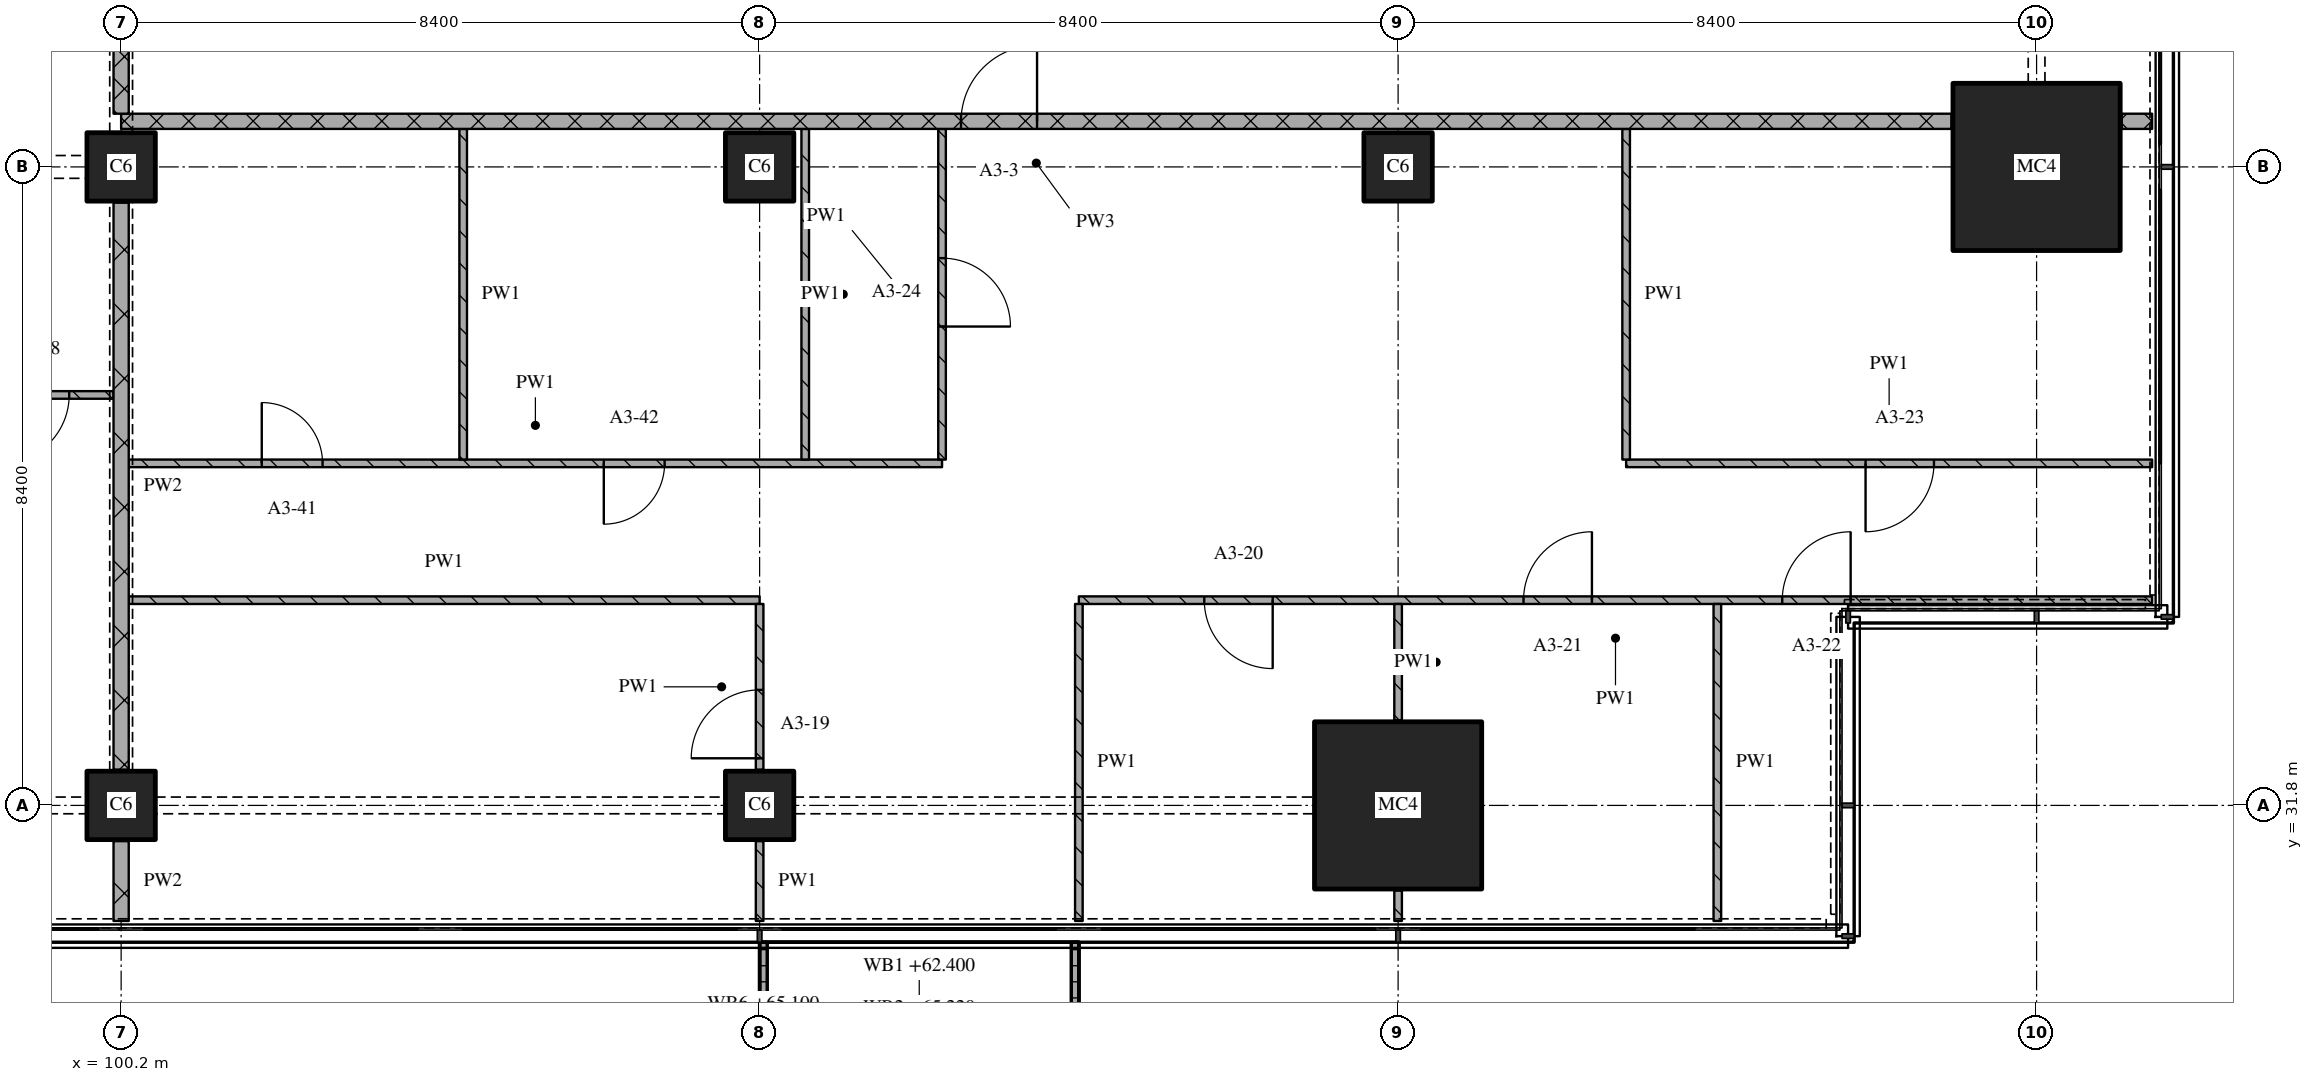
"""IFC4 building model, lengths in metres.
Left out: names, types, materials, properties, quantities, classifications, styles, units other than length and angle.
Written with IfcOpenShell. Run it as: python <this file> out.ifc"""

import sys

from ifc_helpers import new_model, si_unit, direction, frame, frame_2d, origin, origin_2d, place, context, subcontext, project, spatial, polyline, rectangle, outline, extrude, element, fill, save


model = new_model("IFC4")
c1 = context("Model", 3, precision=1e-05, world=origin(), true_north=direction((0.0, 1.0)))
c2 = subcontext(c1, "Body", "Model", "MODEL_VIEW")
j1 = project(units=[si_unit("LENGTHUNIT", "METRE"), si_unit("PLANEANGLEUNIT", "RADIAN")], contexts=[c1])
p1 = place(None, origin())
s1 = spatial("IfcSite", under=j1, at=p1, CompositionType="ELEMENT")
p2 = place(p1, origin())
s2 = spatial("IfcBuilding", under=s1, at=p2, CompositionType="ELEMENT")
p3 = place(p2, frame((0.0, 0.0, 62.4)))
s3 = spatial("IfcBuildingStorey", under=s2, at=p3, CompositionType="ELEMENT", Elevation=62.4)
for number, where, z_axis, x_axis in (
    (1, (100.2, 31.8, 0.0), (0.0, 0.0, 1.0), (1.0, 0.0, 0.0)),
    (2, (100.2, 40.2, 0.0), (0.0, 0.0, 1.0), (1.0, 0.0, 0.0)),
    (3, (108.6, 31.8, 0.0), (0.0, 0.0, 1.0), (1.0, 0.0, 0.0)),
    (4, (108.6, 40.2, 0.0), (0.0, 0.0, 1.0), (1.0, 0.0, 0.0)),
):
    element("IfcColumn", number, at=place(p3, frame(where, z_axis=z_axis, x_axis=x_axis)), inside=s3, PredefinedType="COLUMN", context=c2, shape_type="SweptSolid", body=[
        extrude(rectangle(XDim=0.9, YDim=0.9, at=origin_2d()), origin(), (0.0, 0.0, 1.0), 3.6),
    ])
p4 = place(p3, frame((117.0, 31.8, 0.0), z_axis=(0.0, 0.0, 1.0), x_axis=(1.0, 0.0, 0.0)))
e5 = element("IfcColumn", 5, at=p4, inside=s3, PredefinedType="COLUMN", context=c2, shape_type="SweptSolid", body=[
    extrude(rectangle(XDim=2.2, YDim=2.2, at=origin_2d()), origin(), (0.0, 0.0, 1.0), 3.6),
])
p5 = place(p3, frame((117.0, 40.2, 0.0), z_axis=(0.0, 0.0, 1.0), x_axis=(1.0, 0.0, 0.0)))
e6 = element("IfcColumn", 6, at=p5, inside=s3, PredefinedType="COLUMN", context=c2, shape_type="SweptSolid", body=[
    extrude(rectangle(XDim=0.9, YDim=0.9, at=origin_2d()), origin(), (0.0, 0.0, 1.0), 3.6),
])
p6 = place(p3, frame((125.4, 40.2, 0.0), z_axis=(0.0, 0.0, 1.0), x_axis=(1.0, 0.0, 0.0)))
e7 = element("IfcColumn", 7, at=p6, inside=s3, PredefinedType="COLUMN", context=c2, shape_type="SweptSolid", body=[
    extrude(rectangle(XDim=2.2, YDim=2.2, at=origin_2d()), origin(), (0.0, 0.0, 1.0), 3.6),
])
p7 = place(p3, origin())
e8 = element("IfcWall", 8, at=p7, inside=s3, PredefinedType="SOLIDWALL", context=c2, shape_type="SweptSolid", body=[
    extrude(outline(polyline([(108.6, 30.0), (108.7, 30.0), (108.7, 28.367), (112.7, 28.367), (112.7, 30.0), (112.8, 30.0), (112.8, 28.267), (108.6, 28.267), (108.6, 30.0)])), origin(), (0.0, 0.0, 1.0), 1.0),
])
p8 = place(p3, frame((100.3, 34.5, 0.0), z_axis=(0.0, 0.0, 1.0), x_axis=(1.0, 0.0, 0.0)))
e9 = element("IfcWall", 9, at=p8, inside=s3, PredefinedType="PARTITIONING", context=c2, shape_type="SweptSolid", body=[
    extrude(rectangle(XDim=8.3, YDim=0.1, at=frame_2d((4.15, 0.0))), origin(), (0.0, 0.0, 1.0), 3.32),
])
p9 = place(p3, frame((126.92, 34.5, 0.0), z_axis=(0.0, 0.0, 1.0), x_axis=(-1.0, 0.0, 0.0)))
e10 = element("IfcWall", 10, at=p9, inside=s3, PredefinedType="PARTITIONING", context=c2, shape_type="SweptSolid", body=[
    extrude(rectangle(XDim=14.12, YDim=0.1, at=frame_2d((7.06, 0.0))), origin(), (0.0, 0.0, 1.0), 3.32),
])
p10 = place(p9, frame((3.966, 0.0, 0.0)))
e11 = element("IfcOpeningElement", 11, at=p10, cuts=e10, PredefinedType="OPENING", context=c2, shape_type="SweptSolid", body=[
    extrude(rectangle(XDim=0.9, YDim=2.1, at=frame_2d((0.45, 1.05))), frame((0.0, 0.06, 0.0), z_axis=(0.0, -1.0, 0.0), x_axis=(1.0, 0.0, 0.0)), (0.0, 0.0, 1.0), 0.12),
])
p11 = place(p9, frame((7.37, 0.0, 0.0)))
e12 = element("IfcOpeningElement", 12, at=p11, cuts=e10, PredefinedType="OPENING", context=c2, shape_type="SweptSolid", body=[
    extrude(rectangle(XDim=0.9, YDim=2.1, at=frame_2d((0.45, 1.05))), frame((0.0, 0.06, 0.0), z_axis=(0.0, -1.0, 0.0), x_axis=(1.0, 0.0, 0.0)), (0.0, 0.0, 1.0), 0.12),
])
p12 = place(p9, frame((11.57, 0.0, 0.0)))
e13 = element("IfcOpeningElement", 13, at=p12, cuts=e10, PredefinedType="OPENING", context=c2, shape_type="SweptSolid", body=[
    extrude(rectangle(XDim=0.9, YDim=2.1, at=frame_2d((0.45, 1.05))), frame((0.0, 0.06, 0.0), z_axis=(0.0, -1.0, 0.0), x_axis=(1.0, 0.0, 0.0)), (0.0, 0.0, 1.0), 0.12),
])
p13 = place(p3, frame((100.3, 36.3, 0.0), z_axis=(0.0, 0.0, 1.0), x_axis=(1.0, 0.0, 0.0)))
e14 = element("IfcWall", 14, at=p13, inside=s3, PredefinedType="PARTITIONING", context=c2, shape_type="SweptSolid", body=[
    extrude(rectangle(XDim=10.7, YDim=0.1, at=frame_2d((5.35, 0.0))), origin(), (0.0, 0.0, 1.0), 3.32),
])
p14 = place(p13, frame((1.75, 0.0, 0.0)))
e15 = element("IfcOpeningElement", 15, at=p14, cuts=e14, PredefinedType="OPENING", context=c2, shape_type="SweptSolid", body=[
    extrude(rectangle(XDim=0.8, YDim=2.1, at=frame_2d((0.4, 1.05))), frame((0.0, 0.06, 0.0), z_axis=(0.0, -1.0, 0.0), x_axis=(1.0, 0.0, 0.0)), (0.0, 0.0, 1.0), 0.12),
])
p15 = place(p13, frame((6.25, 0.0, 0.0)))
e16 = element("IfcOpeningElement", 16, at=p15, cuts=e14, PredefinedType="OPENING", context=c2, shape_type="SweptSolid", body=[
    extrude(rectangle(XDim=0.8, YDim=2.1, at=frame_2d((0.4, 1.05))), frame((0.0, 0.06, 0.0), z_axis=(0.0, -1.0, 0.0), x_axis=(1.0, 0.0, 0.0)), (0.0, 0.0, 1.0), 0.12),
])
p16 = place(p3, frame((120.0, 36.3, 0.0), z_axis=(0.0, 0.0, 1.0), x_axis=(1.0, 0.0, 0.0)))
e17 = element("IfcWall", 17, at=p16, inside=s3, PredefinedType="PARTITIONING", context=c2, shape_type="SweptSolid", body=[
    extrude(rectangle(XDim=6.92, YDim=0.1, at=frame_2d((3.46, 0.0))), origin(), (0.0, 0.0, 1.0), 3.32),
])
p17 = place(p16, frame((3.15, 0.0, 0.0)))
e18 = element("IfcOpeningElement", 18, at=p17, cuts=e17, PredefinedType="OPENING", context=c2, shape_type="SweptSolid", body=[
    extrude(rectangle(XDim=0.9, YDim=2.1, at=frame_2d((0.45, 1.05))), frame((0.0, 0.06, 0.0), z_axis=(0.0, -1.0, 0.0), x_axis=(1.0, 0.0, 0.0)), (0.0, 0.0, 1.0), 0.12),
])
p18 = place(p3, frame((89.1, 37.2, 0.0), z_axis=(0.0, 0.0, 1.0), x_axis=(1.0, 0.0, 0.0)))
e19 = element("IfcWall", 19, at=p18, inside=s3, PredefinedType="PARTITIONING", context=c2, shape_type="SweptSolid", body=[
    extrude(rectangle(XDim=11.0, YDim=0.1, at=frame_2d((5.5, 0.0))), origin(), (0.0, 0.0, 1.0), 3.32),
])
p19 = place(p18, frame((6.225, 0.0, 0.0)))
e20 = element("IfcOpeningElement", 20, at=p19, cuts=e19, PredefinedType="OPENING", context=c2, shape_type="SweptSolid", body=[
    extrude(rectangle(XDim=0.8, YDim=2.1, at=frame_2d((0.4, 1.05))), frame((0.0, 0.06, 0.0), z_axis=(0.0, -1.0, 0.0), x_axis=(1.0, 0.0, 0.0)), (0.0, 0.0, 1.0), 0.12),
])
p20 = place(p18, frame((9.517, 0.0, 0.0)))
e21 = element("IfcOpeningElement", 21, at=p20, cuts=e19, PredefinedType="OPENING", context=c2, shape_type="SweptSolid", body=[
    extrude(rectangle(XDim=0.9, YDim=2.1, at=frame_2d((0.45, 1.05))), frame((0.0, 0.06, 0.0), z_axis=(0.0, -1.0, 0.0), x_axis=(1.0, 0.0, 0.0)), (0.0, 0.0, 1.0), 0.12),
])
p21 = place(p3, frame((124.28, 40.8, 0.0), z_axis=(0.0, 0.0, 1.0), x_axis=(-1.0, 0.0, 0.0)))
e22 = element("IfcWall", 22, at=p21, inside=s3, PredefinedType="PARTITIONING", context=c2, shape_type="SweptSolid", body=[
    extrude(rectangle(XDim=24.08, YDim=0.2, at=frame_2d((12.04, 0.0))), origin(), (0.0, 0.0, 1.0), 3.32),
])
p22 = place(p21, frame((12.03, 0.0, 0.0)))
e23 = element("IfcOpeningElement", 23, at=p22, cuts=e22, PredefinedType="OPENING", context=c2, shape_type="SweptSolid", body=[
    extrude(rectangle(XDim=1.0, YDim=2.1, at=frame_2d((0.5, 1.05))), frame((0.0, 0.11, 0.0), z_axis=(0.0, -1.0, 0.0), x_axis=(1.0, 0.0, 0.0)), (0.0, 0.0, 1.0), 0.22),
])
p23 = place(p3, frame((126.52, 40.8, 0.0), z_axis=(0.0, 0.0, 1.0), x_axis=(1.0, 0.0, 0.0)))
e24 = element("IfcWall", 24, at=p23, inside=s3, PredefinedType="PARTITIONING", context=c2, shape_type="SweptSolid", body=[
    extrude(rectangle(XDim=0.4, YDim=0.2, at=frame_2d((0.2, 0.0))), origin(), (0.0, 0.0, 1.0), 3.32),
])
p24 = place(p3, frame((100.2, 43.1, 0.0), z_axis=(0.0, 0.0, 1.0), x_axis=(0.0, -1.0, 0.0)))
e25 = element("IfcWall", 25, at=p24, inside=s3, PredefinedType="PARTITIONING", context=c2, shape_type="SweptSolid", body=[
    extrude(rectangle(XDim=2.2, YDim=0.2, at=frame_2d((1.1, 0.0))), origin(), (0.0, 0.0, 1.0), 2.43),
])
p25 = place(p3, frame((100.2, 31.33, 0.0), z_axis=(0.0, 0.0, 1.0), x_axis=(0.0, -1.0, 0.0)))
e26 = element("IfcWall", 26, at=p25, inside=s3, PredefinedType="PARTITIONING", context=c2, shape_type="SweptSolid", body=[
    extrude(rectangle(XDim=1.05, YDim=0.2, at=frame_2d((0.525, 0.0))), origin(), (0.0, 0.0, 1.0), 3.32),
])
p26 = place(p3, frame((100.2, 39.73, 0.0), z_axis=(0.0, 0.0, 1.0), x_axis=(0.0, -1.0, 0.0)))
e27 = element("IfcWall", 27, at=p26, inside=s3, PredefinedType="PARTITIONING", context=c2, shape_type="SweptSolid", body=[
    extrude(rectangle(XDim=7.46, YDim=0.2, at=frame_2d((3.73, 0.0))), origin(), (0.0, 0.0, 1.0), 2.83),
])
p27 = place(p3, frame((104.7, 40.7, 0.0), z_axis=(0.0, 0.0, 1.0), x_axis=(0.0, -1.0, 0.0)))
e28 = element("IfcWall", 28, at=p27, inside=s3, PredefinedType="PARTITIONING", context=c2, shape_type="SweptSolid", body=[
    extrude(rectangle(XDim=4.35, YDim=0.1, at=frame_2d((2.175, 0.0))), origin(), (0.0, 0.0, 1.0), 3.32),
])
p28 = place(p3, frame((108.6, 31.33, 0.0), z_axis=(0.0, 0.0, 1.0), x_axis=(0.0, -1.0, 0.0)))
e29 = element("IfcWall", 29, at=p28, inside=s3, PredefinedType="PARTITIONING", context=c2, shape_type="SweptSolid", body=[
    extrude(rectangle(XDim=1.05, YDim=0.1, at=frame_2d((0.525, 0.0))), origin(), (0.0, 0.0, 1.0), 3.32),
])
p29 = place(p3, frame((108.6, 32.27, 0.0), z_axis=(0.0, 0.0, 1.0), x_axis=(0.0, 1.0, 0.0)))
e30 = element("IfcWall", 30, at=p29, inside=s3, PredefinedType="PARTITIONING", context=c2, shape_type="SweptSolid", body=[
    extrude(rectangle(XDim=2.18, YDim=0.1, at=frame_2d((1.09, 0.0))), origin(), (0.0, 0.0, 1.0), 3.32),
])
p30 = place(p29, frame((0.15, 0.0, 0.0)))
e31 = element("IfcOpeningElement", 31, at=p30, cuts=e30, PredefinedType="OPENING", context=c2, shape_type="SweptSolid", body=[
    extrude(rectangle(XDim=0.9, YDim=2.1, at=frame_2d((0.45, 1.05))), frame((0.0, 0.06, 0.0), z_axis=(0.0, -1.0, 0.0), x_axis=(1.0, 0.0, 0.0)), (0.0, 0.0, 1.0), 0.12),
])
p31 = place(p3, frame((109.2, 40.7, 0.0), z_axis=(0.0, 0.0, 1.0), x_axis=(0.0, -1.0, 0.0)))
e32 = element("IfcWall", 32, at=p31, inside=s3, PredefinedType="PARTITIONING", context=c2, shape_type="SweptSolid", body=[
    extrude(rectangle(XDim=4.35, YDim=0.1, at=frame_2d((2.175, 0.0))), origin(), (0.0, 0.0, 1.0), 3.32),
])
p32 = place(p3, frame((111.0, 36.35, 0.0), z_axis=(0.0, 0.0, 1.0), x_axis=(0.0, 1.0, 0.0)))
e33 = element("IfcWall", 33, at=p32, inside=s3, PredefinedType="PARTITIONING", context=c2, shape_type="SweptSolid", body=[
    extrude(rectangle(XDim=4.35, YDim=0.1, at=frame_2d((2.175, 0.0))), origin(), (0.0, 0.0, 1.0), 3.32),
])
p33 = place(p32, frame((1.75, 0.0, 0.0)))
e34 = element("IfcOpeningElement", 34, at=p33, cuts=e33, PredefinedType="OPENING", context=c2, shape_type="SweptSolid", body=[
    extrude(rectangle(XDim=0.9, YDim=2.1, at=frame_2d((0.45, 1.05))), frame((0.0, 0.06, 0.0), z_axis=(0.0, -1.0, 0.0), x_axis=(1.0, 0.0, 0.0)), (0.0, 0.0, 1.0), 0.12),
])
p34 = place(p3, frame((112.8, 34.45, 0.0), z_axis=(0.0, 0.0, 1.0), x_axis=(0.0, -1.0, 0.0)))
e35 = element("IfcWall", 35, at=p34, inside=s3, PredefinedType="PARTITIONING", context=c2, shape_type="SweptSolid", body=[
    extrude(rectangle(XDim=4.17, YDim=0.1, at=frame_2d((2.085, 0.0))), origin(), (0.0, 0.0, 1.0), 3.32),
])
p35 = place(p3, frame((117.0, 30.68, 0.0), z_axis=(0.0, 0.0, 1.0), x_axis=(0.0, -1.0, 0.0)))
e36 = element("IfcWall", 36, at=p35, inside=s3, PredefinedType="PARTITIONING", context=c2, shape_type="SweptSolid", body=[
    extrude(rectangle(XDim=0.4, YDim=0.1, at=frame_2d((0.2, 0.0))), origin(), (0.0, 0.0, 1.0), 3.32),
])
p36 = place(p3, frame((117.0, 34.45, 0.0), z_axis=(0.0, 0.0, 1.0), x_axis=(0.0, -1.0, 0.0)))
e37 = element("IfcWall", 37, at=p36, inside=s3, PredefinedType="PARTITIONING", context=c2, shape_type="SweptSolid", body=[
    extrude(rectangle(XDim=1.53, YDim=0.1, at=frame_2d((0.765, 0.0))), origin(), (0.0, 0.0, 1.0), 3.32),
])
p37 = place(p3, frame((120.0, 40.7, 0.0), z_axis=(0.0, 0.0, 1.0), x_axis=(0.0, -1.0, 0.0)))
e38 = element("IfcWall", 38, at=p37, inside=s3, PredefinedType="PARTITIONING", context=c2, shape_type="SweptSolid", body=[
    extrude(rectangle(XDim=4.35, YDim=0.1, at=frame_2d((2.175, 0.0))), origin(), (0.0, 0.0, 1.0), 3.32),
])
p38 = place(p3, frame((121.2, 34.45, 0.0), z_axis=(0.0, 0.0, 1.0), x_axis=(0.0, -1.0, 0.0)))
e39 = element("IfcWall", 39, at=p38, inside=s3, PredefinedType="PARTITIONING", context=c2, shape_type="SweptSolid", body=[
    extrude(rectangle(XDim=4.17, YDim=0.1, at=frame_2d((2.085, 0.0))), origin(), (0.0, 0.0, 1.0), 3.32),
])
p39 = place(p10, origin())
e40 = element("IfcDoor", 40, at=p39, inside=s3, OperationType="SINGLE_SWING_RIGHT", PredefinedType="DOOR", context=c2, shape_type="SweptSolid", body=[
    extrude(rectangle(XDim=0.9, YDim=2.1, at=frame_2d((0.45, 1.05))), frame((0.0, 0.025, 0.0), z_axis=(0.0, -1.0, 0.0), x_axis=(1.0, 0.0, 0.0)), (0.0, 0.0, 1.0), 0.05),
])
fill(e11, e40)
p40 = place(p11, origin())
e41 = element("IfcDoor", 41, at=p40, inside=s3, OperationType="SINGLE_SWING_RIGHT", PredefinedType="DOOR", context=c2, shape_type="SweptSolid", body=[
    extrude(rectangle(XDim=0.9, YDim=2.1, at=frame_2d((0.45, 1.05))), frame((0.0, 0.025, 0.0), z_axis=(0.0, -1.0, 0.0), x_axis=(1.0, 0.0, 0.0)), (0.0, 0.0, 1.0), 0.05),
])
fill(e12, e41)
p41 = place(p12, origin())
e42 = element("IfcDoor", 42, at=p41, inside=s3, OperationType="SINGLE_SWING_LEFT", PredefinedType="DOOR", context=c2, shape_type="SweptSolid", body=[
    extrude(rectangle(XDim=0.9, YDim=2.1, at=frame_2d((0.45, 1.05))), frame((0.0, 0.025, 0.0), z_axis=(0.0, -1.0, 0.0), x_axis=(1.0, 0.0, 0.0)), (0.0, 0.0, 1.0), 0.05),
])
fill(e13, e42)
p42 = place(p14, origin())
e43 = element("IfcDoor", 43, at=p42, inside=s3, OperationType="SINGLE_SWING_LEFT", PredefinedType="DOOR", context=c2, shape_type="SweptSolid", body=[
    extrude(rectangle(XDim=0.8, YDim=2.1, at=frame_2d((0.4, 1.05))), frame((0.0, 0.025, 0.0), z_axis=(0.0, -1.0, 0.0), x_axis=(1.0, 0.0, 0.0)), (0.0, 0.0, 1.0), 0.05),
])
fill(e15, e43)
p43 = place(p15, origin())
e44 = element("IfcDoor", 44, at=p43, inside=s3, OperationType="SINGLE_SWING_RIGHT", PredefinedType="DOOR", context=c2, shape_type="SweptSolid", body=[
    extrude(rectangle(XDim=0.8, YDim=2.1, at=frame_2d((0.4, 1.05))), frame((0.0, 0.025, 0.0), z_axis=(0.0, -1.0, 0.0), x_axis=(1.0, 0.0, 0.0)), (0.0, 0.0, 1.0), 0.05),
])
fill(e16, e44)
p44 = place(p17, origin())
e45 = element("IfcDoor", 45, at=p44, inside=s3, OperationType="SINGLE_SWING_RIGHT", PredefinedType="DOOR", context=c2, shape_type="SweptSolid", body=[
    extrude(rectangle(XDim=0.9, YDim=2.1, at=frame_2d((0.45, 1.05))), frame((0.0, 0.025, 0.0), z_axis=(0.0, -1.0, 0.0), x_axis=(1.0, 0.0, 0.0)), (0.0, 0.0, 1.0), 0.05),
])
fill(e18, e45)
p45 = place(p20, origin())
e46 = element("IfcDoor", 46, at=p45, inside=s3, OperationType="SINGLE_SWING_RIGHT", PredefinedType="DOOR", context=c2, shape_type="SweptSolid", body=[
    extrude(rectangle(XDim=0.9, YDim=2.1, at=frame_2d((0.45, 1.05))), frame((0.0, 0.025, 0.0), z_axis=(0.0, -1.0, 0.0), x_axis=(1.0, 0.0, 0.0)), (0.0, 0.0, 1.0), 0.05),
])
fill(e21, e46)
p46 = place(p22, origin())
e47 = element("IfcDoor", 47, at=p46, inside=s3, OperationType="SINGLE_SWING_RIGHT", PredefinedType="DOOR", context=c2, shape_type="SweptSolid", body=[
    extrude(rectangle(XDim=1.0, YDim=2.1, at=frame_2d((0.5, 1.05))), frame((0.0, 0.025, 0.0), z_axis=(0.0, -1.0, 0.0), x_axis=(1.0, 0.0, 0.0)), (0.0, 0.0, 1.0), 0.05),
])
fill(e23, e47)
p47 = place(p30, origin())
e48 = element("IfcDoor", 48, at=p47, inside=s3, OperationType="SINGLE_SWING_LEFT", PredefinedType="DOOR", context=c2, shape_type="SweptSolid", body=[
    extrude(rectangle(XDim=0.9, YDim=2.1, at=frame_2d((0.45, 1.05))), frame((0.0, 0.025, 0.0), z_axis=(0.0, -1.0, 0.0), x_axis=(1.0, 0.0, 0.0)), (0.0, 0.0, 1.0), 0.05),
])
fill(e31, e48)
p48 = place(p33, origin())
e49 = element("IfcDoor", 49, at=p48, inside=s3, OperationType="SINGLE_SWING_RIGHT", PredefinedType="DOOR", context=c2, shape_type="SweptSolid", body=[
    extrude(rectangle(XDim=0.9, YDim=2.1, at=frame_2d((0.45, 1.05))), frame((0.0, 0.025, 0.0), z_axis=(0.0, -1.0, 0.0), x_axis=(1.0, 0.0, 0.0)), (0.0, 0.0, 1.0), 0.05),
])
fill(e34, e49)
save(model, sys.argv[1])
